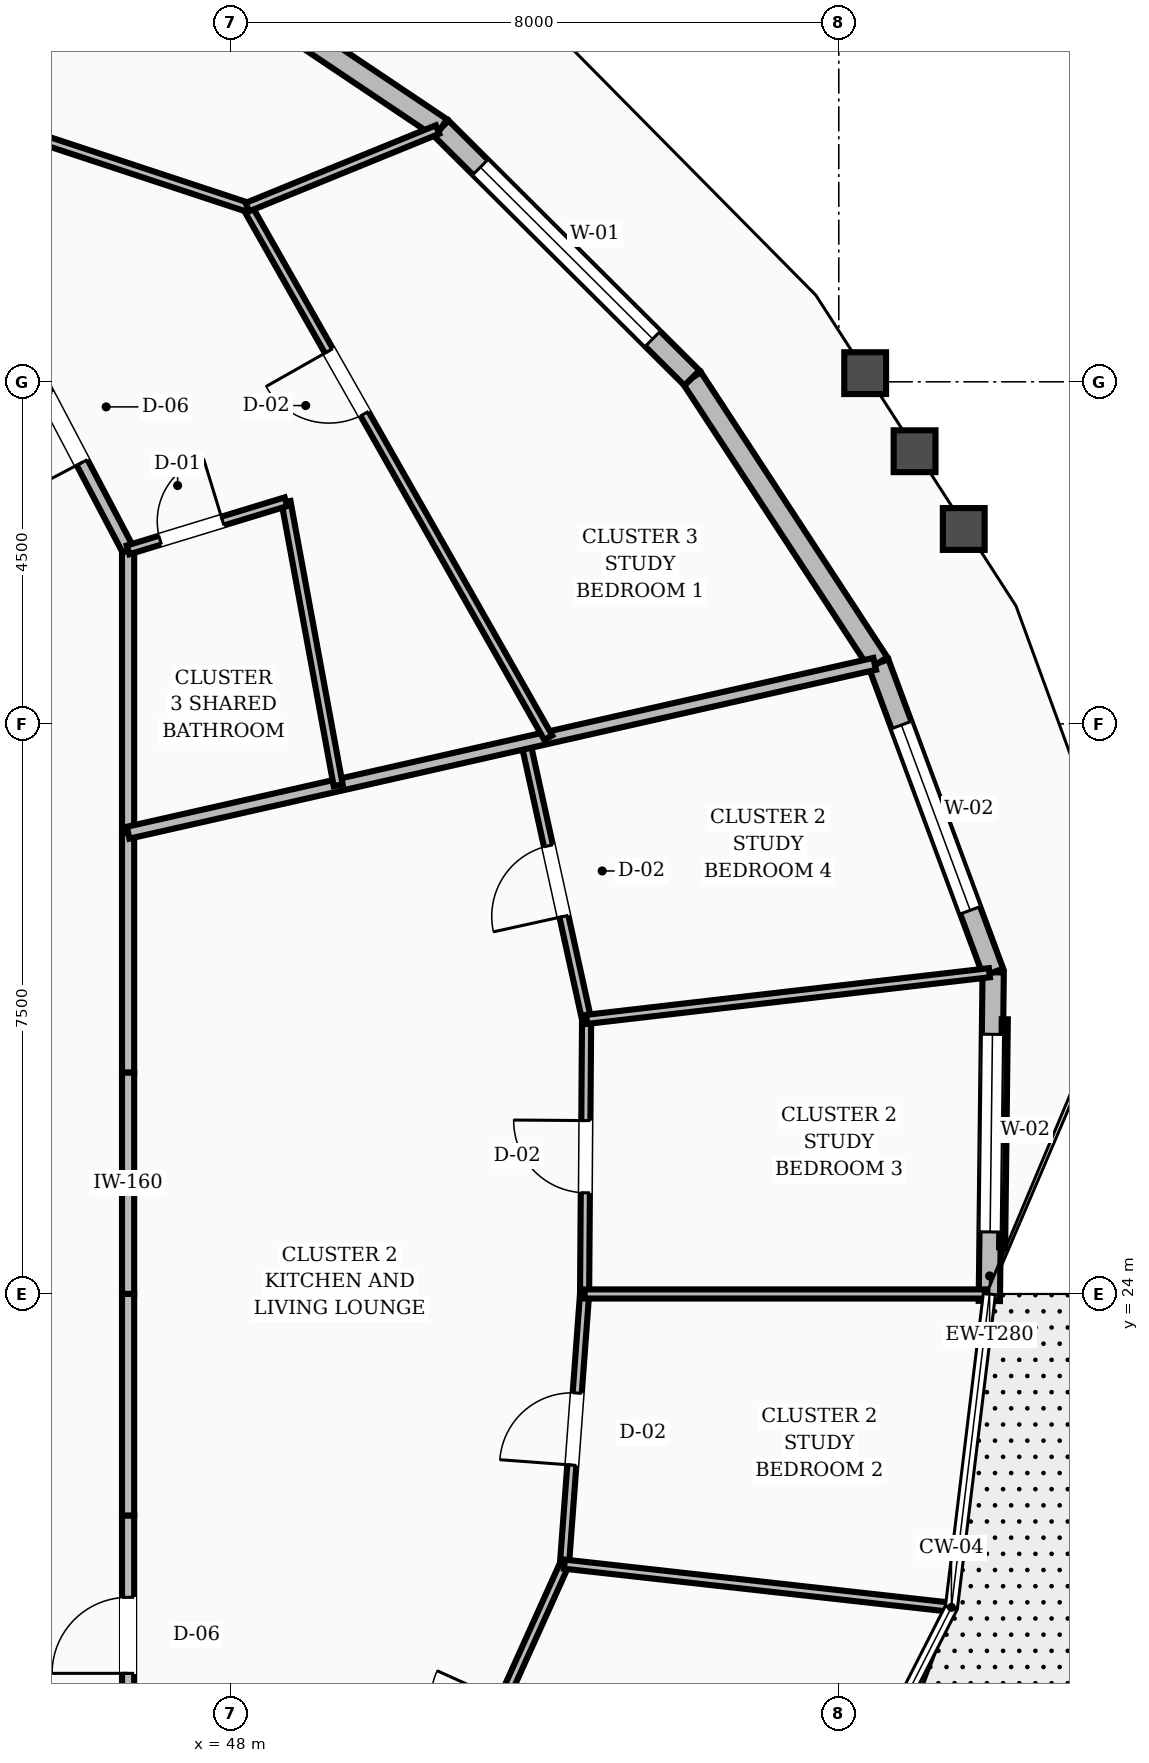
"""IFC4 building model, lengths in metres.
Left out: names, types, materials, properties, quantities, classifications, styles, units other than length and angle.
Written with IfcOpenShell. Run it as: python <this file> out.ifc"""

import sys

from ifc_helpers import new_model, si_unit, direction, frame, frame_2d, origin, place, context, subcontext, project, spatial, rectangle, extrude, element, fill, save


model = new_model("IFC4")
c1 = context("Model", 3, precision=1e-05, world=origin(), true_north=direction((0.0, 1.0)))
c2 = subcontext(c1, "Body", "Model", "MODEL_VIEW")
j1 = project(units=[si_unit("LENGTHUNIT", "METRE"), si_unit("PLANEANGLEUNIT", "RADIAN")], contexts=[c1])
p1 = place(None, origin())
s1 = spatial("IfcSite", under=j1, at=p1, CompositionType="ELEMENT")
p2 = place(p1, origin())
s2 = spatial("IfcBuilding", under=s1, at=p2, CompositionType="ELEMENT")
p3 = place(p2, frame((0.0, 0.0, 135.2)))
s3 = spatial("IfcBuildingStorey", under=s2, at=p3, CompositionType="ELEMENT", Elevation=135.2)
p4 = place(p3, frame((57.98, 23.908, 0.0), z_axis=(0.0, 0.0, 1.0), x_axis=(0.011800420546, 0.999930372613, 0.0)))
e1 = element("IfcWall", 1, at=p4, inside=s3, PredefinedType="STANDARD", context=c2, shape_type="SweptSolid", body=[
    extrude(rectangle(XDim=4.324, YDim=0.28, at=frame_2d((2.162, 0.0))), origin(), (0.0, 0.0, 1.0), 2.82),
])
p5 = place(p4, frame((0.908, 0.0, 0.8)))
e2 = element("IfcOpeningElement", 2, at=p5, cuts=e1, PredefinedType="OPENING", context=c2, shape_type="SweptSolid", body=[
    extrude(rectangle(XDim=2.6, YDim=1.65, at=frame_2d((1.3, 0.825))), frame((0.0, 0.15, 0.0), z_axis=(0.0, -1.0, 0.0), x_axis=(1.0, 0.0, 0.0)), (0.0, 0.0, 1.0), 0.3),
])
p6 = place(p3, frame((58.031, 28.232, 0.0), z_axis=(0.0, 0.0, 1.0), x_axis=(-0.347959140817, 0.937509699321, 0.0)))
e3 = element("IfcWall", 3, at=p6, inside=s3, PredefinedType="STANDARD", context=c2, shape_type="SweptSolid", body=[
    extrude(rectangle(XDim=4.34, YDim=0.28, at=frame_2d((2.17, 0.0))), origin(), (0.0, 0.0, 1.0), 2.82),
])
p7 = place(p6, frame((0.87, 0.0, 0.8)))
e4 = element("IfcOpeningElement", 4, at=p7, cuts=e3, PredefinedType="OPENING", context=c2, shape_type="SweptSolid", body=[
    extrude(rectangle(XDim=2.6, YDim=1.65, at=frame_2d((1.3, 0.825))), frame((0.0, 0.15, 0.0), z_axis=(0.0, -1.0, 0.0), x_axis=(1.0, 0.0, 0.0)), (0.0, 0.0, 1.0), 0.3),
])
p8 = place(p3, frame((56.521, 32.301, 0.0), z_axis=(0.0, 0.0, 1.0), x_axis=(-0.547360926274, 0.83689665813, 0.0)))
e5 = element("IfcWall", 5, at=p8, inside=s3, PredefinedType="STANDARD", context=c2, shape_type="SweptSolid", body=[
    extrude(rectangle(XDim=4.481, YDim=0.28, at=frame_2d((2.24, 0.0))), origin(), (0.0, 0.0, 1.0), 2.82),
])
p9 = place(p3, frame((54.068, 36.051, 0.0), z_axis=(0.0, 0.0, 1.0), x_axis=(-0.708572716766, 0.705637800188, 0.0)))
e6 = element("IfcWall", 6, at=p9, inside=s3, PredefinedType="STANDARD", context=c2, shape_type="SweptSolid", body=[
    extrude(rectangle(XDim=4.658, YDim=0.28, at=frame_2d((2.329, 0.0))), origin(), (0.0, 0.0, 1.0), 2.82),
])
p10 = place(p9, frame((0.729, 0.0, 0.8)))
e7 = element("IfcOpeningElement", 7, at=p10, cuts=e6, PredefinedType="OPENING", context=c2, shape_type="SweptSolid", body=[
    extrude(rectangle(XDim=3.2, YDim=1.65, at=frame_2d((1.6, 0.825))), frame((0.0, 0.15, 0.0), z_axis=(0.0, -1.0, 0.0), x_axis=(1.0, 0.0, 0.0)), (0.0, 0.0, 1.0), 0.3),
])
p11 = place(p3, frame((50.768, 39.338, 0.0), z_axis=(0.0, 0.0, 1.0), x_axis=(-0.830503660309, 0.557013168797, 0.0)))
e8 = element("IfcWall", 8, at=p11, inside=s3, PredefinedType="STANDARD", context=c2, shape_type="SweptSolid", body=[
    extrude(rectangle(XDim=4.843, YDim=0.28, at=frame_2d((2.421, 0.0))), origin(), (0.0, 0.0, 1.0), 2.82),
])
p12 = place(p3, frame((46.65, 24.0, 0.0), z_axis=(0.0, 0.0, 1.0), x_axis=(0.0, 1.0, 0.0)))
e9 = element("IfcWall", 9, at=p12, inside=s3, PredefinedType="SOLIDWALL", context=c2, shape_type="SweptSolid", body=[
    extrude(rectangle(XDim=2.914, YDim=0.16, at=frame_2d((1.457, 0.0))), origin(), (0.0, 0.0, 1.0), 2.8),
])
p13 = place(p3, frame((46.65, 26.914, 0.0), z_axis=(0.0, 0.0, 1.0), x_axis=(0.0, 1.0, 0.0)))
e10 = element("IfcWall", 10, at=p13, inside=s3, PredefinedType="SOLIDWALL", context=c2, shape_type="SweptSolid", body=[
    extrude(rectangle(XDim=3.154, YDim=0.16, at=frame_2d((1.577, 0.0))), origin(), (0.0, 0.0, 1.0), 2.8),
])
p14 = place(p3, frame((46.65, 30.068, 0.0), z_axis=(0.0, 0.0, 1.0), x_axis=(0.0, 1.0, 0.0)))
e11 = element("IfcWall", 11, at=p14, inside=s3, PredefinedType="SOLIDWALL", context=c2, shape_type="SweptSolid", body=[
    extrude(rectangle(XDim=3.721, YDim=0.16, at=frame_2d((1.86, 0.0))), origin(), (0.0, 0.0, 1.0), 2.8),
])
p15 = place(p3, frame((46.65, 33.789, 0.0), z_axis=(0.0, 0.0, 1.0), x_axis=(-0.46527115782, 0.885168204185, 0.0)))
e12 = element("IfcWall", 12, at=p15, inside=s3, PredefinedType="SOLIDWALL", context=c2, shape_type="SweptSolid", body=[
    extrude(rectangle(XDim=3.6, YDim=0.16, at=frame_2d((1.8, 0.0))), origin(), (0.0, 0.0, 1.0), 2.8),
])
p16 = place(p15, frame((1.3, 0.0, 0.0)))
e13 = element("IfcOpeningElement", 13, at=p16, cuts=e12, PredefinedType="OPENING", context=c2, shape_type="SweptSolid", body=[
    extrude(rectangle(XDim=1.0, YDim=2.1, at=frame_2d((0.5, 1.05))), frame((0.0, 0.09, 0.0), z_axis=(0.0, -1.0, 0.0), x_axis=(1.0, 0.0, 0.0)), (0.0, 0.0, 1.0), 0.18),
])
p17 = place(p3, frame((46.65, 17.932, 0.0), z_axis=(0.0, 0.0, 1.0), x_axis=(0.0, 1.0, 0.0)))
e14 = element("IfcWall", 14, at=p17, inside=s3, PredefinedType="SOLIDWALL", context=c2, shape_type="SweptSolid", body=[
    extrude(rectangle(XDim=3.154, YDim=0.16, at=frame_2d((1.577, 0.0))), origin(), (0.0, 0.0, 1.0), 2.8),
])
p18 = place(p17, frame((1.077, 0.0, 0.0)))
e15 = element("IfcOpeningElement", 15, at=p18, cuts=e14, PredefinedType="OPENING", context=c2, shape_type="SweptSolid", body=[
    extrude(rectangle(XDim=1.0, YDim=2.1, at=frame_2d((0.5, 1.05))), frame((0.0, 0.09, 0.0), z_axis=(0.0, -1.0, 0.0), x_axis=(1.0, 0.0, 0.0)), (0.0, 0.0, 1.0), 0.18),
])
p19 = place(p3, frame((46.65, 21.086, 0.0), z_axis=(0.0, 0.0, 1.0), x_axis=(0.0, 1.0, 0.0)))
e16 = element("IfcWall", 16, at=p19, inside=s3, PredefinedType="SOLIDWALL", context=c2, shape_type="SweptSolid", body=[
    extrude(rectangle(XDim=2.914, YDim=0.16, at=frame_2d((1.457, 0.0))), origin(), (0.0, 0.0, 1.0), 2.8),
])
p20 = place(p3, frame((49.395, 13.805, 0.0), z_axis=(0.0, 0.0, 1.0), x_axis=(0.411281396403, 0.911508427264, 0.0)))
e17 = element("IfcWall", 17, at=p20, inside=s3, PredefinedType="PARTITIONING", context=c2, shape_type="SweptSolid", body=[
    extrude(rectangle(XDim=7.285, YDim=0.12, at=frame_2d((3.642, 0.0))), origin(), (0.0, 0.0, 1.0), 2.8),
])
p21 = place(p20, frame((4.367, 0.0, 0.0)))
e18 = element("IfcOpeningElement", 18, at=p21, cuts=e17, PredefinedType="OPENING", context=c2, shape_type="SweptSolid", body=[
    extrude(rectangle(XDim=0.95, YDim=2.1, at=frame_2d((0.475, 1.05))), frame((0.0, 0.07, 0.0), z_axis=(0.0, -1.0, 0.0), x_axis=(1.0, 0.0, 0.0)), (0.0, 0.0, 1.0), 0.14),
])
p22 = place(p3, frame((52.391, 20.446, 0.0), z_axis=(0.0, 0.0, 1.0), x_axis=(0.074182020041, 0.997244718162, 0.0)))
e19 = element("IfcWall", 19, at=p22, inside=s3, PredefinedType="PARTITIONING", context=c2, shape_type="SweptSolid", body=[
    extrude(rectangle(XDim=3.564, YDim=0.12, at=frame_2d((1.782, 0.0))), origin(), (0.0, 0.0, 1.0), 2.8),
])
p23 = place(p22, frame((1.307, 0.0, 0.0)))
e20 = element("IfcOpeningElement", 20, at=p23, cuts=e19, PredefinedType="OPENING", context=c2, shape_type="SweptSolid", body=[
    extrude(rectangle(XDim=0.95, YDim=2.1, at=frame_2d((0.475, 1.05))), frame((0.0, 0.07, 0.0), z_axis=(0.0, -1.0, 0.0), x_axis=(1.0, 0.0, 0.0)), (0.0, 0.0, 1.0), 0.14),
])
p24 = place(p3, frame((52.391, 20.446, 0.0), z_axis=(0.0, 0.0, 1.0), x_axis=(0.993832563856, -0.110891095313, 0.0)))
e21 = element("IfcWall", 21, at=p24, inside=s3, PredefinedType="PARTITIONING", context=c2, shape_type="SweptSolid", body=[
    extrude(rectangle(XDim=5.073, YDim=0.12, at=frame_2d((2.536, 0.0))), origin(), (0.0, 0.0, 1.0), 2.8),
])
p25 = place(p3, frame((52.656, 24.0, 0.0), z_axis=(0.0, 0.0, 1.0), x_axis=(0.007366656013, 0.999972865821, 0.0)))
e22 = element("IfcWall", 22, at=p25, inside=s3, PredefinedType="PARTITIONING", context=c2, shape_type="SweptSolid", body=[
    extrude(rectangle(XDim=3.612, YDim=0.12, at=frame_2d((1.806, 0.0))), origin(), (0.0, 0.0, 1.0), 2.8),
])
p26 = place(p25, frame((1.331, 0.0, 0.0)))
e23 = element("IfcOpeningElement", 23, at=p26, cuts=e22, PredefinedType="OPENING", context=c2, shape_type="SweptSolid", body=[
    extrude(rectangle(XDim=0.95, YDim=2.1, at=frame_2d((0.475, 1.05))), frame((0.0, 0.07, 0.0), z_axis=(0.0, -1.0, 0.0), x_axis=(1.0, 0.0, 0.0)), (0.0, 0.0, 1.0), 0.14),
])
p27 = place(p3, frame((52.656, 24.0, 0.0), z_axis=(0.0, 0.0, 1.0), x_axis=(1.0, 0.0, 0.0)))
e24 = element("IfcWall", 24, at=p27, inside=s3, PredefinedType="PARTITIONING", context=c2, shape_type="SweptSolid", body=[
    extrude(rectangle(XDim=5.276, YDim=0.12, at=frame_2d((2.638, 0.0))), origin(), (0.0, 0.0, 1.0), 2.8),
])
p28 = place(p3, frame((52.682, 27.612, 0.0), z_axis=(0.0, 0.0, 1.0), x_axis=(-0.214841783998, 0.976648866199, 0.0)))
e25 = element("IfcWall", 25, at=p28, inside=s3, PredefinedType="PARTITIONING", context=c2, shape_type="SweptSolid", body=[
    extrude(rectangle(XDim=3.726, YDim=0.12, at=frame_2d((1.863, 0.0))), origin(), (0.0, 0.0, 1.0), 2.8),
])
p29 = place(p28, frame((1.388, 0.0, 0.0)))
e26 = element("IfcOpeningElement", 26, at=p29, cuts=e25, PredefinedType="OPENING", context=c2, shape_type="SweptSolid", body=[
    extrude(rectangle(XDim=0.95, YDim=2.1, at=frame_2d((0.475, 1.05))), frame((0.0, 0.07, 0.0), z_axis=(0.0, -1.0, 0.0), x_axis=(1.0, 0.0, 0.0)), (0.0, 0.0, 1.0), 0.14),
])
p30 = place(p3, frame((52.682, 27.612, 0.0), z_axis=(0.0, 0.0, 1.0), x_axis=(0.993365373341, 0.115001021938, 0.0)))
e27 = element("IfcWall", 27, at=p30, inside=s3, PredefinedType="PARTITIONING", context=c2, shape_type="SweptSolid", body=[
    extrude(rectangle(XDim=5.335, YDim=0.12, at=frame_2d((2.667, 0.0))), origin(), (0.0, 0.0, 1.0), 2.8),
])
p31 = place(p3, frame((46.65, 30.068, 0.0), z_axis=(0.0, 0.0, 1.0), x_axis=(0.975360958505, 0.220615050765, 0.0)))
e28 = element("IfcWall", 28, at=p31, inside=s3, PredefinedType="SOLIDWALL", context=c2, shape_type="SweptSolid", body=[
    extrude(rectangle(XDim=10.07, YDim=0.16, at=frame_2d((5.035, 0.0))), origin(), (0.0, 0.0, 1.0), 2.8),
])
p32 = place(p3, frame((49.414, 30.693, 0.0), z_axis=(0.0, 0.0, 1.0), x_axis=(-0.181134567916, 0.983458320574, 0.0)))
e29 = element("IfcWall", 29, at=p32, inside=s3, PredefinedType="PARTITIONING", context=c2, shape_type="SweptSolid", body=[
    extrude(rectangle(XDim=3.792, YDim=0.12, at=frame_2d((1.896, 0.0))), origin(), (0.0, 0.0, 1.0), 2.8),
])
p33 = place(p3, frame((46.65, 33.789, 0.0), z_axis=(0.0, 0.0, 1.0), x_axis=(0.956529436115, 0.291635796578, 0.0)))
e30 = element("IfcWall", 30, at=p33, inside=s3, PredefinedType="PARTITIONING", context=c2, shape_type="SweptSolid", body=[
    extrude(rectangle(XDim=2.172, YDim=0.12, at=frame_2d((1.086, 0.0))), origin(), (0.0, 0.0, 1.0), 2.8),
])
p34 = place(p33, frame((0.44, 0.0, 0.0)))
e31 = element("IfcOpeningElement", 31, at=p34, cuts=e30, PredefinedType="OPENING", context=c2, shape_type="SweptSolid", body=[
    extrude(rectangle(XDim=0.86, YDim=2.1, at=frame_2d((0.43, 1.05))), frame((0.0, 0.07, 0.0), z_axis=(0.0, -1.0, 0.0), x_axis=(1.0, 0.0, 0.0)), (0.0, 0.0, 1.0), 0.14),
])
p35 = place(p3, frame((52.178, 31.318, 0.0), z_axis=(0.0, 0.0, 1.0), x_axis=(-0.493371027673, 0.869818963378, 0.0)))
e32 = element("IfcWall", 32, at=p35, inside=s3, PredefinedType="PARTITIONING", context=c2, shape_type="SweptSolid", body=[
    extrude(rectangle(XDim=8.024, YDim=0.12, at=frame_2d((4.012, 0.0))), origin(), (0.0, 0.0, 1.0), 2.8),
])
p36 = place(p35, frame((4.9, 0.0, 0.0)))
e33 = element("IfcOpeningElement", 33, at=p36, cuts=e32, PredefinedType="OPENING", context=c2, shape_type="SweptSolid", body=[
    extrude(rectangle(XDim=0.95, YDim=2.1, at=frame_2d((0.475, 1.05))), frame((0.0, 0.07, 0.0), z_axis=(0.0, -1.0, 0.0), x_axis=(1.0, 0.0, 0.0)), (0.0, 0.0, 1.0), 0.14),
])
p37 = place(p3, frame((48.219, 38.298, 0.0), z_axis=(0.0, 0.0, 1.0), x_axis=(-0.949596025741, 0.313476295591, 0.0)))
e34 = element("IfcWall", 34, at=p37, inside=s3, PredefinedType="PARTITIONING", context=c2, shape_type="SweptSolid", body=[
    extrude(rectangle(XDim=8.575, YDim=0.12, at=frame_2d((4.288, 0.0))), origin(), (0.0, 0.0, 1.0), 2.8),
])
p38 = place(p37, frame((3.813, 0.0, 0.0)))
e35 = element("IfcOpeningElement", 35, at=p38, cuts=e34, PredefinedType="OPENING", context=c2, shape_type="SweptSolid", body=[
    extrude(rectangle(XDim=0.95, YDim=2.1, at=frame_2d((0.475, 1.05))), frame((0.0, 0.07, 0.0), z_axis=(0.0, -1.0, 0.0), x_axis=(1.0, 0.0, 0.0)), (0.0, 0.0, 1.0), 0.14),
])
p39 = place(p3, frame((48.219, 38.298, 0.0), z_axis=(0.0, 0.0, 1.0), x_axis=(0.925932117974, 0.377689969293, 0.0)))
e36 = element("IfcWall", 36, at=p39, inside=s3, PredefinedType="PARTITIONING", context=c2, shape_type="SweptSolid", body=[
    extrude(rectangle(XDim=2.703, YDim=0.12, at=frame_2d((1.351, 0.0))), origin(), (0.0, 0.0, 1.0), 2.8),
])
p40 = place(p5, origin())
e37 = element("IfcWindow", 37, at=p40, inside=s3, PartitioningType="SINGLE_PANEL", PredefinedType="WINDOW", context=c2, shape_type="SweptSolid", body=[
    extrude(rectangle(XDim=2.6, YDim=1.65, at=frame_2d((1.3, 0.825))), frame((0.0, 0.03, 0.0), z_axis=(0.0, -1.0, 0.0), x_axis=(1.0, 0.0, 0.0)), (0.0, 0.0, 1.0), 0.06),
])
fill(e2, e37)
p41 = place(p7, origin())
e38 = element("IfcWindow", 38, at=p41, inside=s3, PartitioningType="SINGLE_PANEL", PredefinedType="WINDOW", context=c2, shape_type="SweptSolid", body=[
    extrude(rectangle(XDim=2.6, YDim=1.65, at=frame_2d((1.3, 0.825))), frame((0.0, 0.03, 0.0), z_axis=(0.0, -1.0, 0.0), x_axis=(1.0, 0.0, 0.0)), (0.0, 0.0, 1.0), 0.06),
])
fill(e4, e38)
p42 = place(p10, origin())
e39 = element("IfcWindow", 39, at=p42, inside=s3, PartitioningType="SINGLE_PANEL", PredefinedType="WINDOW", context=c2, shape_type="SweptSolid", body=[
    extrude(rectangle(XDim=3.2, YDim=1.65, at=frame_2d((1.6, 0.825))), frame((0.0, 0.03, 0.0), z_axis=(0.0, -1.0, 0.0), x_axis=(1.0, 0.0, 0.0)), (0.0, 0.0, 1.0), 0.06),
])
fill(e7, e39)
p43 = place(p18, origin())
e40 = element("IfcDoor", 40, at=p43, inside=s3, OperationType="SINGLE_SWING_LEFT", PredefinedType="DOOR", context=c2, shape_type="SweptSolid", body=[
    extrude(rectangle(XDim=1.0, YDim=2.1, at=frame_2d((0.5, 1.05))), frame((0.0, 0.025, 0.0), z_axis=(0.0, -1.0, 0.0), x_axis=(1.0, 0.0, 0.0)), (0.0, 0.0, 1.0), 0.05),
])
fill(e15, e40)
p44 = place(p23, origin())
e41 = element("IfcDoor", 41, at=p44, inside=s3, OperationType="SINGLE_SWING_LEFT", PredefinedType="DOOR", context=c2, shape_type="SweptSolid", body=[
    extrude(rectangle(XDim=0.95, YDim=2.1, at=frame_2d((0.475, 1.05))), frame((0.0, 0.025, 0.0), z_axis=(0.0, -1.0, 0.0), x_axis=(1.0, 0.0, 0.0)), (0.0, 0.0, 1.0), 0.05),
])
fill(e20, e41)
p45 = place(p26, origin())
e42 = element("IfcDoor", 42, at=p45, inside=s3, OperationType="SINGLE_SWING_RIGHT", PredefinedType="DOOR", context=c2, shape_type="SweptSolid", body=[
    extrude(rectangle(XDim=0.95, YDim=2.1, at=frame_2d((0.475, 1.05))), frame((0.0, 0.025, 0.0), z_axis=(0.0, -1.0, 0.0), x_axis=(1.0, 0.0, 0.0)), (0.0, 0.0, 1.0), 0.05),
])
fill(e23, e42)
p46 = place(p29, origin())
e43 = element("IfcDoor", 43, at=p46, inside=s3, OperationType="SINGLE_SWING_LEFT", PredefinedType="DOOR", context=c2, shape_type="SweptSolid", body=[
    extrude(rectangle(XDim=0.95, YDim=2.1, at=frame_2d((0.475, 1.05))), frame((0.0, 0.025, 0.0), z_axis=(0.0, -1.0, 0.0), x_axis=(1.0, 0.0, 0.0)), (0.0, 0.0, 1.0), 0.05),
])
fill(e26, e43)
p47 = place(p34, origin())
e44 = element("IfcDoor", 44, at=p47, inside=s3, OperationType="SINGLE_SWING_RIGHT", PredefinedType="DOOR", context=c2, shape_type="SweptSolid", body=[
    extrude(rectangle(XDim=0.86, YDim=2.1, at=frame_2d((0.43, 1.05))), frame((0.0, 0.025, 0.0), z_axis=(0.0, -1.0, 0.0), x_axis=(1.0, 0.0, 0.0)), (0.0, 0.0, 1.0), 0.05),
])
fill(e31, e44)
p48 = place(p16, origin())
e45 = element("IfcDoor", 45, at=p48, inside=s3, OperationType="SINGLE_SWING_LEFT", PredefinedType="DOOR", context=c2, shape_type="SweptSolid", body=[
    extrude(rectangle(XDim=1.0, YDim=2.1, at=frame_2d((0.5, 1.05))), frame((0.0, 0.025, 0.0), z_axis=(0.0, -1.0, 0.0), x_axis=(1.0, 0.0, 0.0)), (0.0, 0.0, 1.0), 0.05),
])
fill(e13, e45)
p49 = place(p36, origin())
e46 = element("IfcDoor", 46, at=p49, inside=s3, OperationType="SINGLE_SWING_RIGHT", PredefinedType="DOOR", context=c2, shape_type="SweptSolid", body=[
    extrude(rectangle(XDim=0.95, YDim=2.1, at=frame_2d((0.475, 1.05))), frame((0.0, 0.025, 0.0), z_axis=(0.0, -1.0, 0.0), x_axis=(1.0, 0.0, 0.0)), (0.0, 0.0, 1.0), 0.05),
])
fill(e33, e46)
save(model, sys.argv[1])
